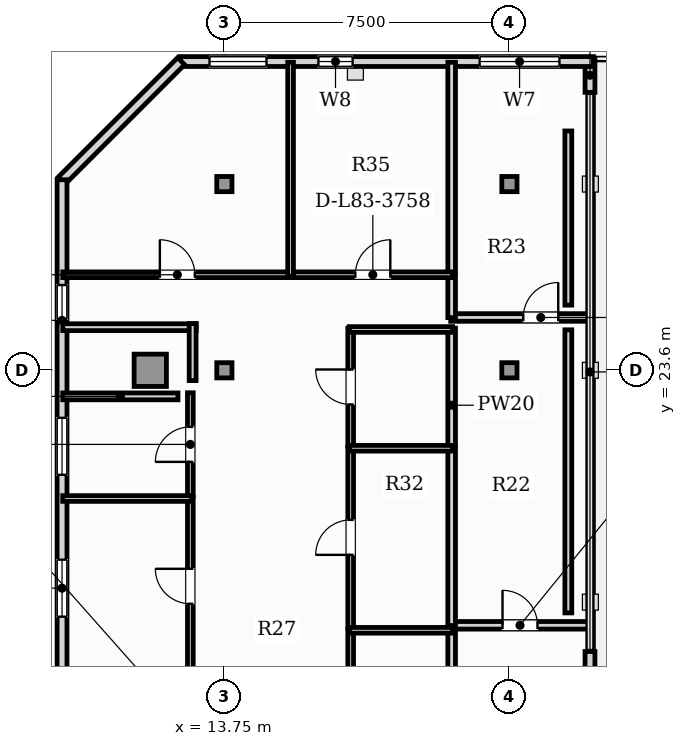
"""IFC4 building model, lengths in metres.
Left out: names, types, materials, properties, quantities, classifications, styles, units other than length and angle.
Written with IfcOpenShell. Run it as: python <this file> out.ifc"""

import sys

from ifc_helpers import new_model, si_unit, direction, frame, frame_2d, origin, origin_2d, place, context, subcontext, project, spatial, rectangle, hollow_rectangle, extrude, element, fill, save


model = new_model("IFC4")
c1 = context("Model", 3, precision=1e-05, world=origin(), true_north=direction((0.0, 1.0)))
c2 = subcontext(c1, "Body", "Model", "MODEL_VIEW")
j1 = project(units=[si_unit("LENGTHUNIT", "METRE"), si_unit("PLANEANGLEUNIT", "RADIAN")], contexts=[c1])
p1 = place(None, origin())
s1 = spatial("IfcSite", under=j1, at=p1, CompositionType="ELEMENT")
p2 = place(p1, origin())
s2 = spatial("IfcBuilding", under=s1, at=p2, CompositionType="ELEMENT")
p3 = place(p2, frame((0.0, 0.0, 337.5)))
s3 = spatial("IfcBuildingStorey", under=s2, at=p3, CompositionType="ELEMENT", Elevation=337.5)
p4 = place(p3, frame((11.8, 23.6, 0.0), z_axis=(0.0, 0.0, 1.0), x_axis=(1.0, 0.0, 0.0)))
e1 = element("IfcColumn", 1, at=p4, inside=s3, PredefinedType="USERDEFINED", context=c2, shape_type="SweptSolid", body=[
    extrude(hollow_rectangle(XDim=0.85, YDim=0.85, WallThickness=0.05, at=origin_2d()), origin(), (0.0, 0.0, 1.0), 3.85),
])
for number, where, z_axis, x_axis in (
    (2, (13.75, 23.6, 0.0), (0.0, 0.0, 1.0), (1.0, 0.0, 0.0)),
    (3, (21.25, 23.6, 0.0), (0.0, 0.0, 1.0), (1.0, 0.0, 0.0)),
    (4, (13.75, 28.5, 0.0), (0.0, 0.0, 1.0), (1.0, 0.0, 0.0)),
    (5, (21.25, 28.5, 0.0), (0.0, 0.0, 1.0), (1.0, 0.0, 0.0)),
):
    element("IfcColumn", number, at=place(p3, frame(where, z_axis=z_axis, x_axis=x_axis)), inside=s3, PredefinedType="COLUMN", context=c2, shape_type="SweptSolid", body=[
        extrude(hollow_rectangle(XDim=0.4, YDim=0.4, WallThickness=0.02, at=origin_2d()), origin(), (0.0, 0.0, 1.0), 3.85),
    ])
p5 = place(p3, frame((23.37, 12.4, 0.0), z_axis=(0.0, 0.0, 1.0), x_axis=(0.0, 1.0, 0.0)))
e6 = element("IfcWall", 6, at=p5, inside=s3, PredefinedType="SOLIDWALL", context=c2, shape_type="SweptSolid", body=[
    extrude(rectangle(XDim=3.8, YDim=0.26, at=frame_2d((1.9, 0.0))), origin(), (0.0, 0.0, 1.0), 3.17),
])
p6 = place(p5, frame((1.85, 0.0, 0.0)))
e7 = element("IfcOpeningElement", 7, at=p6, cuts=e6, PredefinedType="OPENING", context=c2, shape_type="SweptSolid", body=[
    extrude(rectangle(XDim=1.2, YDim=2.2, at=frame_2d((0.6, 1.1))), frame((0.0, 0.14, 0.0), z_axis=(0.0, -1.0, 0.0), x_axis=(1.0, 0.0, 0.0)), (0.0, 0.0, 1.0), 0.28),
])
p7 = place(p3, frame((23.37, 30.914, 0.0), z_axis=(0.0, 0.0, 1.0), x_axis=(0.0, 1.0, 0.0)))
e8 = element("IfcWall", 8, at=p7, inside=s3, PredefinedType="SOLIDWALL", context=c2, shape_type="SweptSolid", body=[
    extrude(rectangle(XDim=0.9, YDim=0.26, at=frame_2d((0.45, 0.0))), origin(), (0.0, 0.0, 1.0), 3.63),
])
p8 = place(p3, frame((23.46, 31.724, 0.0), z_axis=(0.0, 0.0, 1.0), x_axis=(-1.0, 0.0, 0.0)))
e9 = element("IfcWall", 9, at=p8, inside=s3, PredefinedType="SOLIDWALL", context=c2, shape_type="SweptSolid", body=[
    extrude(rectangle(XDim=10.872, YDim=0.26, at=frame_2d((5.436, 0.0))), origin(), (0.0, 0.0, 1.0), 3.63),
])
p9 = place(p8, frame((0.893, 0.0, 0.85)))
e10 = element("IfcOpeningElement", 10, at=p9, cuts=e9, PredefinedType="OPENING", context=c2, shape_type="SweptSolid", body=[
    extrude(rectangle(XDim=2.1, YDim=2.05, at=frame_2d((1.05, 1.025))), frame((0.0, 0.14, 0.0), z_axis=(0.0, -1.0, 0.0), x_axis=(1.0, 0.0, 0.0)), (0.0, 0.0, 1.0), 0.28),
])
p10 = place(p8, frame((8.602, 0.0, 0.9)))
e11 = element("IfcOpeningElement", 11, at=p10, cuts=e9, PredefinedType="OPENING", context=c2, shape_type="SweptSolid", body=[
    extrude(rectangle(XDim=1.5, YDim=1.95, at=frame_2d((0.75, 0.975))), frame((0.0, 0.14, 0.0), z_axis=(0.0, -1.0, 0.0), x_axis=(1.0, 0.0, 0.0)), (0.0, 0.0, 1.0), 0.28),
])
p11 = place(p8, frame((6.336, 0.0, 0.9)))
e12 = element("IfcOpeningElement", 12, at=p11, cuts=e9, PredefinedType="OPENING", context=c2, shape_type="SweptSolid", body=[
    extrude(rectangle(XDim=0.9, YDim=1.4, at=frame_2d((0.45, 0.7))), frame((0.0, 0.14, 0.0), z_axis=(0.0, -1.0, 0.0), x_axis=(1.0, 0.0, 0.0)), (0.0, 0.0, 1.0), 0.28),
])
p12 = place(p3, frame((12.612, 31.734, 0.0), z_axis=(0.0, 0.0, 1.0), x_axis=(-0.707106781187, -0.707106781187, 0.0)))
e13 = element("IfcWall", 13, at=p12, inside=s3, PredefinedType="SOLIDWALL", context=c2, shape_type="SweptSolid", body=[
    extrude(rectangle(XDim=4.446, YDim=0.26, at=frame_2d((2.223, 0.0))), origin(), (0.0, 0.0, 1.0), 3.63),
])
p13 = place(p3, frame((9.479, 28.614, 0.0), z_axis=(0.0, 0.0, 1.0), x_axis=(0.0, -1.0, 0.0)))
e14 = element("IfcWall", 14, at=p13, inside=s3, PredefinedType="SOLIDWALL", context=c2, shape_type="SweptSolid", body=[
    extrude(rectangle(XDim=25.374, YDim=0.26, at=frame_2d((12.687, 0.0))), origin(), (0.0, 0.0, 1.0), 3.63),
])
p14 = place(p13, frame((18.497, 0.0, 0.9)))
e15 = element("IfcOpeningElement", 15, at=p14, cuts=e14, PredefinedType="OPENING", context=c2, shape_type="SweptSolid", body=[
    extrude(rectangle(XDim=1.5, YDim=1.95, at=frame_2d((0.75, 0.975))), frame((0.0, 0.14, 0.0), z_axis=(0.0, -1.0, 0.0), x_axis=(1.0, 0.0, 0.0)), (0.0, 0.0, 1.0), 0.28),
])
p15 = place(p13, frame((2.77, 0.0, 0.95)))
e16 = element("IfcOpeningElement", 16, at=p15, cuts=e14, PredefinedType="OPENING", context=c2, shape_type="SweptSolid", body=[
    extrude(rectangle(XDim=0.9, YDim=1.5, at=frame_2d((0.45, 0.75))), frame((0.0, 0.14, 0.0), z_axis=(0.0, -1.0, 0.0), x_axis=(1.0, 0.0, 0.0)), (0.0, 0.0, 1.0), 0.28),
])
p16 = place(p13, frame((9.997, 0.0, 0.9)))
e17 = element("IfcOpeningElement", 17, at=p16, cuts=e14, PredefinedType="OPENING", context=c2, shape_type="SweptSolid", body=[
    extrude(rectangle(XDim=1.5, YDim=1.95, at=frame_2d((0.75, 0.975))), frame((0.0, 0.14, 0.0), z_axis=(0.0, -1.0, 0.0), x_axis=(1.0, 0.0, 0.0)), (0.0, 0.0, 1.0), 0.28),
])
p17 = place(p13, frame((6.264, 0.0, 0.9)))
e18 = element("IfcOpeningElement", 18, at=p17, cuts=e14, PredefinedType="OPENING", context=c2, shape_type="SweptSolid", body=[
    extrude(rectangle(XDim=1.5, YDim=1.95, at=frame_2d((0.75, 0.975))), frame((0.0, 0.14, 0.0), z_axis=(0.0, -1.0, 0.0), x_axis=(1.0, 0.0, 0.0)), (0.0, 0.0, 1.0), 0.28),
])
p18 = place(p3, frame((19.705, 16.89, 0.0), z_axis=(0.0, 0.0, 1.0), x_axis=(1.0, 0.0, 0.0)))
e19 = element("IfcWall", 19, at=p18, inside=s3, PredefinedType="PARTITIONING", context=c2, shape_type="SweptSolid", body=[
    extrude(rectangle(XDim=3.647, YDim=0.2, at=frame_2d((1.823, 0.0))), origin(), (0.0, 0.0, 1.0), 3.63),
])
p19 = place(p18, frame((1.364, 0.0, 0.0)))
e20 = element("IfcOpeningElement", 20, at=p19, cuts=e19, PredefinedType="OPENING", context=c2, shape_type="SweptSolid", body=[
    extrude(rectangle(XDim=0.92, YDim=2.1, at=frame_2d((0.46, 1.05))), frame((0.0, 0.11, 0.0), z_axis=(0.0, -1.0, 0.0), x_axis=(1.0, 0.0, 0.0)), (0.0, 0.0, 1.0), 0.22),
])
p20 = place(p3, frame((19.73, 12.805, 0.0), z_axis=(0.0, 0.0, 1.0), x_axis=(0.0, 1.0, 0.0)))
e21 = element("IfcWall", 21, at=p20, inside=s3, PredefinedType="PARTITIONING", context=c2, shape_type="SweptSolid", body=[
    extrude(rectangle(XDim=3.989, YDim=0.2, at=frame_2d((1.995, 0.0))), origin(), (0.0, 0.0, 1.0), 3.63),
])
p21 = place(p3, frame((19.705, 24.99, 0.0), z_axis=(0.0, 0.0, 1.0), x_axis=(1.0, 0.0, 0.0)))
e22 = element("IfcWall", 22, at=p21, inside=s3, PredefinedType="PARTITIONING", context=c2, shape_type="SweptSolid", body=[
    extrude(rectangle(XDim=3.646, YDim=0.2, at=frame_2d((1.823, 0.0))), origin(), (0.0, 0.0, 1.0), 3.63),
])
p22 = place(p21, frame((1.91, 0.0, 0.0)))
e23 = element("IfcOpeningElement", 23, at=p22, cuts=e22, PredefinedType="OPENING", context=c2, shape_type="SweptSolid", body=[
    extrude(rectangle(XDim=0.92, YDim=2.1, at=frame_2d((0.46, 1.05))), frame((0.0, 0.11, 0.0), z_axis=(0.0, -1.0, 0.0), x_axis=(1.0, 0.0, 0.0)), (0.0, 0.0, 1.0), 0.22),
])
p23 = place(p3, frame((19.73, 16.885, 0.0), z_axis=(0.0, 0.0, 1.0), x_axis=(0.0, 1.0, 0.0)))
e24 = element("IfcWall", 24, at=p23, inside=s3, PredefinedType="PARTITIONING", context=c2, shape_type="SweptSolid", body=[
    extrude(rectangle(XDim=4.698, YDim=0.2, at=frame_2d((2.349, 0.0))), origin(), (0.0, 0.0, 1.0), 3.63),
])
p24 = place(p3, frame((19.73, 21.614, 0.0), z_axis=(0.0, 0.0, 1.0), x_axis=(0.0, 1.0, 0.0)))
e25 = element("IfcWall", 25, at=p24, inside=s3, PredefinedType="PARTITIONING", context=c2, shape_type="SweptSolid", body=[
    extrude(rectangle(XDim=3.095, YDim=0.2, at=frame_2d((1.548, 0.0))), origin(), (0.0, 0.0, 1.0), 3.63),
])
p25 = place(p3, frame((19.73, 24.985, 0.0), z_axis=(0.0, 0.0, 1.0), x_axis=(0.0, 1.0, 0.0)))
e26 = element("IfcWall", 26, at=p25, inside=s3, PredefinedType="PARTITIONING", context=c2, shape_type="SweptSolid", body=[
    extrude(rectangle(XDim=1.164, YDim=0.2, at=frame_2d((0.582, 0.0))), origin(), (0.0, 0.0, 1.0), 3.63),
])
p26 = place(p3, frame((19.73, 26.179, 0.0), z_axis=(0.0, 0.0, 1.0), x_axis=(0.0, 1.0, 0.0)))
e27 = element("IfcWall", 27, at=p26, inside=s3, PredefinedType="PARTITIONING", context=c2, shape_type="SweptSolid", body=[
    extrude(rectangle(XDim=5.526, YDim=0.2, at=frame_2d((2.763, 0.0))), origin(), (0.0, 0.0, 1.0), 3.63),
])
p27 = place(p3, frame((12.854, 15.573, 0.0), z_axis=(0.0, 0.0, 1.0), x_axis=(0.0, 1.0, 0.0)))
e28 = element("IfcWall", 28, at=p27, inside=s3, PredefinedType="PARTITIONING", context=c2, shape_type="SweptSolid", body=[
    extrude(rectangle(XDim=4.688, YDim=0.15, at=frame_2d((2.344, 0.0))), origin(), (0.0, 0.0, 1.0), 3.63),
])
p28 = place(p27, frame((1.884, 0.0, 0.0)))
e29 = element("IfcOpeningElement", 29, at=p28, cuts=e28, PredefinedType="OPENING", context=c2, shape_type="SweptSolid", body=[
    extrude(rectangle(XDim=0.92, YDim=2.1, at=frame_2d((0.46, 1.05))), frame((0.0, 0.085, 0.0), z_axis=(0.0, -1.0, 0.0), x_axis=(1.0, 0.0, 0.0)), (0.0, 0.0, 1.0), 0.17),
])
p29 = place(p3, frame((12.854, 20.291, 0.0), z_axis=(0.0, 0.0, 1.0), x_axis=(0.0, 1.0, 0.0)))
e30 = element("IfcWall", 30, at=p29, inside=s3, PredefinedType="PARTITIONING", context=c2, shape_type="SweptSolid", body=[
    extrude(rectangle(XDim=2.718, YDim=0.15, at=frame_2d((1.359, 0.0))), origin(), (0.0, 0.0, 1.0), 3.63),
])
p30 = place(p29, frame((0.899, 0.0, 0.0)))
e31 = element("IfcOpeningElement", 31, at=p30, cuts=e30, PredefinedType="OPENING", context=c2, shape_type="SweptSolid", body=[
    extrude(rectangle(XDim=0.92, YDim=2.1, at=frame_2d((0.46, 1.05))), frame((0.0, 0.085, 0.0), z_axis=(0.0, -1.0, 0.0), x_axis=(1.0, 0.0, 0.0)), (0.0, 0.0, 1.0), 0.17),
])
p31 = place(p3, frame((17.073, 12.805, 0.0), z_axis=(0.0, 0.0, 1.0), x_axis=(0.0, 1.0, 0.0)))
e32 = element("IfcWall", 32, at=p31, inside=s3, PredefinedType="PARTITIONING", context=c2, shape_type="SweptSolid", body=[
    extrude(rectangle(XDim=3.989, YDim=0.15, at=frame_2d((1.995, 0.0))), origin(), (0.0, 0.0, 1.0), 3.63),
])
p32 = place(p31, frame((1.534, 0.0, 0.0)))
e33 = element("IfcOpeningElement", 33, at=p32, cuts=e32, PredefinedType="OPENING", context=c2, shape_type="SweptSolid", body=[
    extrude(rectangle(XDim=0.92, YDim=2.1, at=frame_2d((0.46, 1.05))), frame((0.0, 0.085, 0.0), z_axis=(0.0, -1.0, 0.0), x_axis=(1.0, 0.0, 0.0)), (0.0, 0.0, 1.0), 0.17),
])
p33 = place(p3, frame((17.073, 16.824, 0.0), z_axis=(0.0, 0.0, 1.0), x_axis=(0.0, 1.0, 0.0)))
e34 = element("IfcWall", 34, at=p33, inside=s3, PredefinedType="PARTITIONING", context=c2, shape_type="SweptSolid", body=[
    extrude(rectangle(XDim=4.76, YDim=0.15, at=frame_2d((2.38, 0.0))), origin(), (0.0, 0.0, 1.0), 3.63),
])
p34 = place(p33, frame((1.92, 0.0, 0.0)))
e35 = element("IfcOpeningElement", 35, at=p34, cuts=e34, PredefinedType="OPENING", context=c2, shape_type="SweptSolid", body=[
    extrude(rectangle(XDim=0.92, YDim=2.1, at=frame_2d((0.46, 1.05))), frame((0.0, 0.085, 0.0), z_axis=(0.0, -1.0, 0.0), x_axis=(1.0, 0.0, 0.0)), (0.0, 0.0, 1.0), 0.17),
])
p35 = place(p3, frame((17.073, 21.614, 0.0), z_axis=(0.0, 0.0, 1.0), x_axis=(0.0, 1.0, 0.0)))
e36 = element("IfcWall", 36, at=p35, inside=s3, PredefinedType="PARTITIONING", context=c2, shape_type="SweptSolid", body=[
    extrude(rectangle(XDim=3.095, YDim=0.15, at=frame_2d((1.548, 0.0))), origin(), (0.0, 0.0, 1.0), 3.63),
])
p36 = place(p35, frame((1.088, 0.0, 0.0)))
e37 = element("IfcOpeningElement", 37, at=p36, cuts=e36, PredefinedType="OPENING", context=c2, shape_type="SweptSolid", body=[
    extrude(rectangle(XDim=0.92, YDim=2.1, at=frame_2d((0.46, 1.05))), frame((0.0, 0.085, 0.0), z_axis=(0.0, -1.0, 0.0), x_axis=(1.0, 0.0, 0.0)), (0.0, 0.0, 1.0), 0.17),
])
p37 = place(p3, frame((17.038, 24.674, 0.0), z_axis=(0.0, 0.0, 1.0), x_axis=(1.0, 0.0, 0.0)))
e38 = element("IfcWall", 38, at=p37, inside=s3, PredefinedType="PARTITIONING", context=c2, shape_type="SweptSolid", body=[
    extrude(rectangle(XDim=2.717, YDim=0.15, at=frame_2d((1.358, 0.0))), origin(), (0.0, 0.0, 1.0), 3.63),
])
p38 = place(p3, frame((9.498, 26.114, 0.0), z_axis=(0.0, 0.0, 1.0), x_axis=(1.0, 0.0, 0.0)))
e39 = element("IfcWall", 39, at=p38, inside=s3, PredefinedType="PARTITIONING", context=c2, shape_type="SweptSolid", body=[
    extrude(rectangle(XDim=6.029, YDim=0.15, at=frame_2d((3.015, 0.0))), origin(), (0.0, 0.0, 1.0), 3.63),
])
p39 = place(p38, frame((2.554, 0.0, 0.0)))
e40 = element("IfcOpeningElement", 40, at=p39, cuts=e39, PredefinedType="OPENING", context=c2, shape_type="SweptSolid", body=[
    extrude(rectangle(XDim=0.92, YDim=2.1, at=frame_2d((0.46, 1.05))), frame((0.0, 0.085, 0.0), z_axis=(0.0, -1.0, 0.0), x_axis=(1.0, 0.0, 0.0)), (0.0, 0.0, 1.0), 0.17),
])
p40 = place(p3, frame((15.557, 26.114, 0.0), z_axis=(0.0, 0.0, 1.0), x_axis=(1.0, 0.0, 0.0)))
e41 = element("IfcWall", 41, at=p40, inside=s3, PredefinedType="PARTITIONING", context=c2, shape_type="SweptSolid", body=[
    extrude(rectangle(XDim=4.198, YDim=0.15, at=frame_2d((2.099, 0.0))), origin(), (0.0, 0.0, 1.0), 3.63),
])
p41 = place(p40, frame((1.639, 0.0, 0.0)))
e42 = element("IfcOpeningElement", 42, at=p41, cuts=e41, PredefinedType="OPENING", context=c2, shape_type="SweptSolid", body=[
    extrude(rectangle(XDim=0.92, YDim=2.1, at=frame_2d((0.46, 1.05))), frame((0.0, 0.085, 0.0), z_axis=(0.0, -1.0, 0.0), x_axis=(1.0, 0.0, 0.0)), (0.0, 0.0, 1.0), 0.17),
])
p42 = place(p3, frame((9.498, 20.226, 0.0), z_axis=(0.0, 0.0, 1.0), x_axis=(1.0, 0.0, 0.0)))
e43 = element("IfcWall", 43, at=p42, inside=s3, PredefinedType="PARTITIONING", context=c2, shape_type="SweptSolid", body=[
    extrude(rectangle(XDim=3.392, YDim=0.15, at=frame_2d((1.696, 0.0))), origin(), (0.0, 0.0, 1.0), 3.63),
])
for number, where, z_axis, x_axis in (
    (44, (17.038, 16.759, 0.0), (0.0, 0.0, 1.0), (1.0, 0.0, 0.0)),
    (45, (17.038, 21.549, 0.0), (0.0, 0.0, 1.0), (1.0, 0.0, 0.0)),
):
    element("IfcWall", number, at=place(p3, frame(where, z_axis=z_axis, x_axis=x_axis)), inside=s3, PredefinedType="PARTITIONING", context=c2, shape_type="SweptSolid", body=[
        extrude(rectangle(XDim=2.717, YDim=0.15, at=frame_2d((1.358, 0.0))), origin(), (0.0, 0.0, 1.0), 3.63),
    ])
p43 = place(p3, frame((15.492, 26.079, 0.0), z_axis=(0.0, 0.0, 1.0), x_axis=(0.0, 1.0, 0.0)))
e46 = element("IfcWall", 46, at=p43, inside=s3, PredefinedType="PARTITIONING", context=c2, shape_type="SweptSolid", body=[
    extrude(rectangle(XDim=5.625, YDim=0.15, at=frame_2d((2.813, 0.0))), origin(), (0.0, 0.0, 1.0), 3.63),
])
p44 = place(p3, frame((22.8, 24.665, 0.0), z_axis=(0.0, 0.0, 1.0), x_axis=(0.0, -1.0, 0.0)))
e47 = element("IfcWall", 47, at=p44, inside=s3, PredefinedType="PARTITIONING", context=c2, shape_type="SweptSolid", body=[
    extrude(rectangle(XDim=7.448, YDim=0.18, at=frame_2d((3.724, 0.0))), origin(), (0.0, 0.0, 1.0), 3.63),
])
p45 = place(p3, frame((22.8, 29.897, 0.0), z_axis=(0.0, 0.0, 1.0), x_axis=(0.0, -1.0, 0.0)))
e48 = element("IfcWall", 48, at=p45, inside=s3, PredefinedType="PARTITIONING", context=c2, shape_type="SweptSolid", body=[
    extrude(rectangle(XDim=4.582, YDim=0.18, at=frame_2d((2.291, 0.0))), origin(), (0.0, 0.0, 1.0), 3.63),
])
p46 = place(p3, frame((13.01, 24.734, 0.0), z_axis=(0.0, 0.0, 1.0), x_axis=(-1.0, 0.0, 0.0)))
e49 = element("IfcWall", 49, at=p46, inside=s3, PredefinedType="PARTITIONING", context=c2, shape_type="SweptSolid", body=[
    extrude(rectangle(XDim=3.512, YDim=0.18, at=frame_2d((1.756, 0.0))), origin(), (0.0, 0.0, 1.0), 3.63),
])
p47 = place(p3, frame((12.915, 23.329, 0.0), z_axis=(0.0, 0.0, 1.0), x_axis=(0.0, 1.0, 0.0)))
e50 = element("IfcWall", 50, at=p47, inside=s3, PredefinedType="PARTITIONING", context=c2, shape_type="SweptSolid", body=[
    extrude(rectangle(XDim=1.5, YDim=0.18, at=frame_2d((0.75, 0.0))), origin(), (0.0, 0.0, 1.0), 3.63),
])
p48 = place(p3, frame((9.498, 22.914, 0.0), z_axis=(0.0, 0.0, 1.0), x_axis=(1.0, 0.0, 0.0)))
e51 = element("IfcWall", 51, at=p48, inside=s3, PredefinedType="PARTITIONING", context=c2, shape_type="SweptSolid", body=[
    extrude(rectangle(XDim=3.032, YDim=0.18, at=frame_2d((1.516, 0.0))), origin(), (0.0, 0.0, 1.0), 3.63),
])
p49 = place(p9, origin())
e52 = element("IfcWindow", 52, at=p49, inside=s3, PartitioningType="SINGLE_PANEL", PredefinedType="WINDOW", context=c2, shape_type="SweptSolid", body=[
    extrude(rectangle(XDim=2.1, YDim=2.05, at=frame_2d((1.05, 1.025))), frame((0.0, 0.03, 0.0), z_axis=(0.0, -1.0, 0.0), x_axis=(1.0, 0.0, 0.0)), (0.0, 0.0, 1.0), 0.06),
])
fill(e10, e52)
p50 = place(p15, origin())
e53 = element("IfcWindow", 53, at=p50, inside=s3, PartitioningType="SINGLE_PANEL", PredefinedType="WINDOW", context=c2, shape_type="SweptSolid", body=[
    extrude(rectangle(XDim=0.9, YDim=1.5, at=frame_2d((0.45, 0.75))), frame((0.0, 0.03, 0.0), z_axis=(0.0, -1.0, 0.0), x_axis=(1.0, 0.0, 0.0)), (0.0, 0.0, 1.0), 0.06),
])
fill(e16, e53)
p51 = place(p16, origin())
e54 = element("IfcWindow", 54, at=p51, inside=s3, PartitioningType="SINGLE_PANEL", PredefinedType="WINDOW", context=c2, shape_type="SweptSolid", body=[
    extrude(rectangle(XDim=1.5, YDim=1.95, at=frame_2d((0.75, 0.975))), frame((0.0, 0.03, 0.0), z_axis=(0.0, -1.0, 0.0), x_axis=(1.0, 0.0, 0.0)), (0.0, 0.0, 1.0), 0.06),
])
fill(e17, e54)
p52 = place(p17, origin())
e55 = element("IfcWindow", 55, at=p52, inside=s3, PartitioningType="SINGLE_PANEL", PredefinedType="WINDOW", context=c2, shape_type="SweptSolid", body=[
    extrude(rectangle(XDim=1.5, YDim=1.95, at=frame_2d((0.75, 0.975))), frame((0.0, 0.03, 0.0), z_axis=(0.0, -1.0, 0.0), x_axis=(1.0, 0.0, 0.0)), (0.0, 0.0, 1.0), 0.06),
])
fill(e18, e55)
p53 = place(p10, origin())
e56 = element("IfcWindow", 56, at=p53, inside=s3, PartitioningType="SINGLE_PANEL", PredefinedType="WINDOW", context=c2, shape_type="SweptSolid", body=[
    extrude(rectangle(XDim=1.5, YDim=1.95, at=frame_2d((0.75, 0.975))), frame((0.0, 0.03, 0.0), z_axis=(0.0, -1.0, 0.0), x_axis=(1.0, 0.0, 0.0)), (0.0, 0.0, 1.0), 0.06),
])
fill(e11, e56)
p54 = place(p11, origin())
e57 = element("IfcWindow", 57, at=p54, inside=s3, PartitioningType="SINGLE_PANEL", PredefinedType="WINDOW", context=c2, shape_type="SweptSolid", body=[
    extrude(rectangle(XDim=0.9, YDim=1.4, at=frame_2d((0.45, 0.7))), frame((0.0, 0.03, 0.0), z_axis=(0.0, -1.0, 0.0), x_axis=(1.0, 0.0, 0.0)), (0.0, 0.0, 1.0), 0.06),
])
fill(e12, e57)
p55 = place(p19, origin())
e58 = element("IfcDoor", 58, at=p55, inside=s3, OperationType="SINGLE_SWING_LEFT", PredefinedType="DOOR", context=c2, shape_type="SweptSolid", body=[
    extrude(rectangle(XDim=0.92, YDim=2.1, at=frame_2d((0.46, 1.05))), frame((0.0, 0.025, 0.0), z_axis=(0.0, -1.0, 0.0), x_axis=(1.0, 0.0, 0.0)), (0.0, 0.0, 1.0), 0.05),
])
fill(e20, e58)
p56 = place(p22, origin())
e59 = element("IfcDoor", 59, at=p56, inside=s3, OperationType="SINGLE_SWING_RIGHT", PredefinedType="DOOR", context=c2, shape_type="SweptSolid", body=[
    extrude(rectangle(XDim=0.92, YDim=2.1, at=frame_2d((0.46, 1.05))), frame((0.0, 0.025, 0.0), z_axis=(0.0, -1.0, 0.0), x_axis=(1.0, 0.0, 0.0)), (0.0, 0.0, 1.0), 0.05),
])
fill(e23, e59)
p57 = place(p28, origin())
e60 = element("IfcDoor", 60, at=p57, inside=s3, OperationType="SINGLE_SWING_RIGHT", PredefinedType="DOOR", context=c2, shape_type="SweptSolid", body=[
    extrude(rectangle(XDim=0.92, YDim=2.1, at=frame_2d((0.46, 1.05))), frame((0.0, 0.025, 0.0), z_axis=(0.0, -1.0, 0.0), x_axis=(1.0, 0.0, 0.0)), (0.0, 0.0, 1.0), 0.05),
])
fill(e29, e60)
p58 = place(p30, origin())
e61 = element("IfcDoor", 61, at=p58, inside=s3, OperationType="SINGLE_SWING_LEFT", PredefinedType="DOOR", context=c2, shape_type="SweptSolid", body=[
    extrude(rectangle(XDim=0.92, YDim=2.1, at=frame_2d((0.46, 1.05))), frame((0.0, 0.025, 0.0), z_axis=(0.0, -1.0, 0.0), x_axis=(1.0, 0.0, 0.0)), (0.0, 0.0, 1.0), 0.05),
])
fill(e31, e61)
p59 = place(p34, origin())
e62 = element("IfcDoor", 62, at=p59, inside=s3, OperationType="SINGLE_SWING_LEFT", PredefinedType="DOOR", context=c2, shape_type="SweptSolid", body=[
    extrude(rectangle(XDim=0.92, YDim=2.1, at=frame_2d((0.46, 1.05))), frame((0.0, 0.025, 0.0), z_axis=(0.0, -1.0, 0.0), x_axis=(1.0, 0.0, 0.0)), (0.0, 0.0, 1.0), 0.05),
])
fill(e35, e62)
p60 = place(p36, origin())
e63 = element("IfcDoor", 63, at=p60, inside=s3, OperationType="SINGLE_SWING_RIGHT", PredefinedType="DOOR", context=c2, shape_type="SweptSolid", body=[
    extrude(rectangle(XDim=0.92, YDim=2.1, at=frame_2d((0.46, 1.05))), frame((0.0, 0.025, 0.0), z_axis=(0.0, -1.0, 0.0), x_axis=(1.0, 0.0, 0.0)), (0.0, 0.0, 1.0), 0.05),
])
fill(e37, e63)
p61 = place(p39, origin())
e64 = element("IfcDoor", 64, at=p61, inside=s3, OperationType="SINGLE_SWING_LEFT", PredefinedType="DOOR", context=c2, shape_type="SweptSolid", body=[
    extrude(rectangle(XDim=0.92, YDim=2.1, at=frame_2d((0.46, 1.05))), frame((0.0, 0.025, 0.0), z_axis=(0.0, -1.0, 0.0), x_axis=(1.0, 0.0, 0.0)), (0.0, 0.0, 1.0), 0.05),
])
fill(e40, e64)
p62 = place(p41, origin())
e65 = element("IfcDoor", 65, at=p62, inside=s3, OperationType="SINGLE_SWING_RIGHT", PredefinedType="DOOR", context=c2, shape_type="SweptSolid", body=[
    extrude(rectangle(XDim=0.92, YDim=2.1, at=frame_2d((0.46, 1.05))), frame((0.0, 0.025, 0.0), z_axis=(0.0, -1.0, 0.0), x_axis=(1.0, 0.0, 0.0)), (0.0, 0.0, 1.0), 0.05),
])
fill(e42, e65)
save(model, sys.argv[1])
